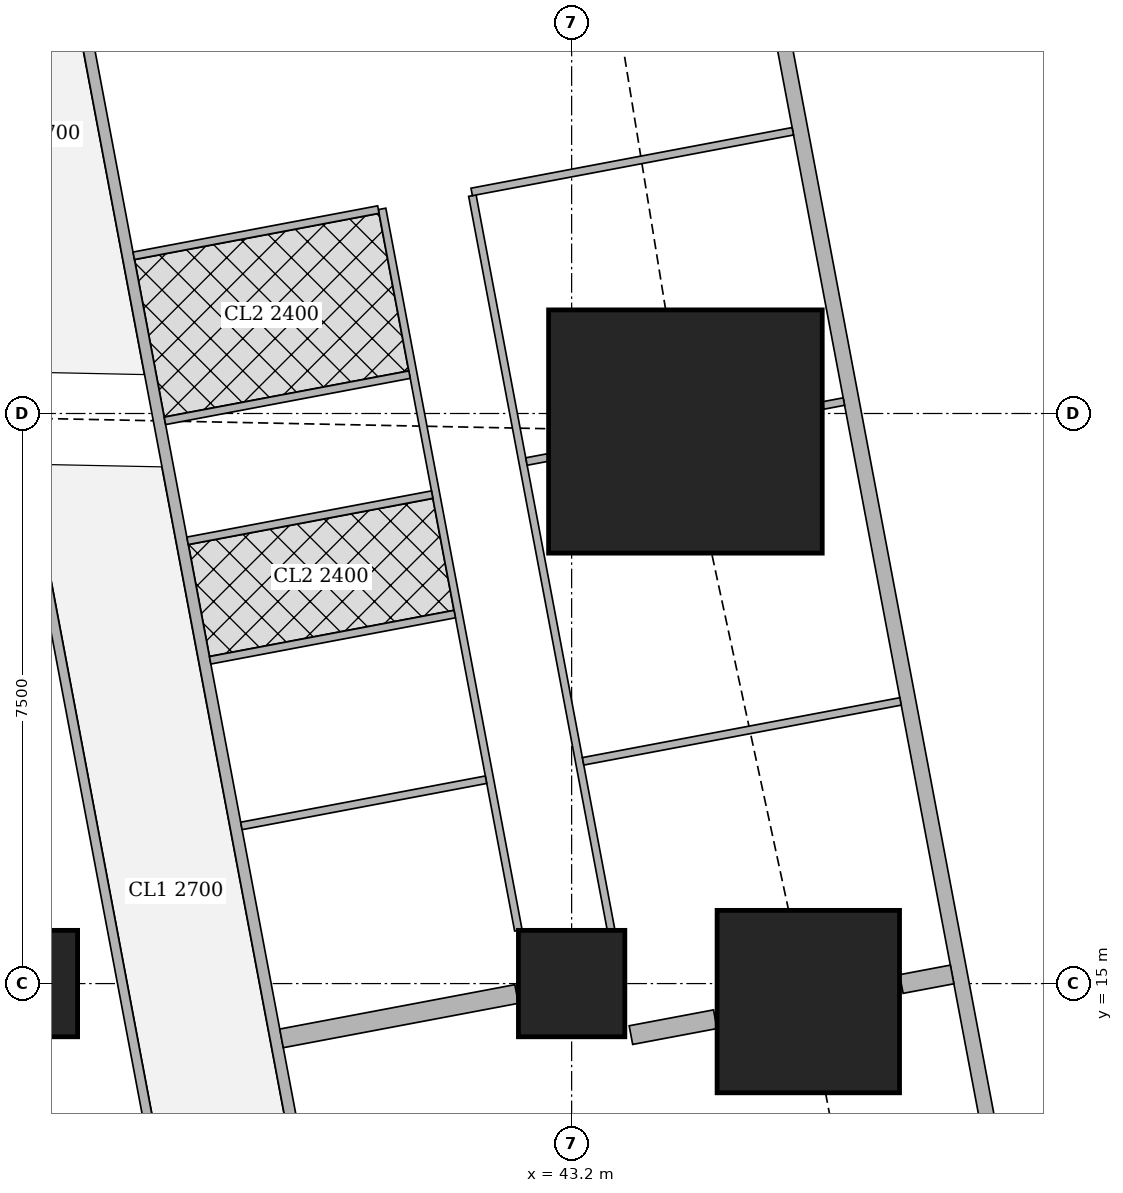
"""IFC4 building model, lengths in metres.
Left out: names, types, materials, properties, quantities, classifications, styles, units other than length and angle.
Written with IfcOpenShell. Run it as: python <this file> out.ifc"""

import sys

from ifc_helpers import new_model, si_unit, direction, frame, frame_2d, origin, origin_2d, place, context, subcontext, project, spatial, rectangle, extrude, element, fill, save


model = new_model("IFC4")
c1 = context("Model", 3, precision=1e-05, world=origin(), true_north=direction((0.0, 1.0)))
c2 = subcontext(c1, "Body", "Model", "MODEL_VIEW")
j1 = project(units=[si_unit("LENGTHUNIT", "METRE"), si_unit("PLANEANGLEUNIT", "RADIAN")], contexts=[c1])
p1 = place(None, origin())
s1 = spatial("IfcSite", under=j1, at=p1, CompositionType="ELEMENT")
p2 = place(p1, origin())
s2 = spatial("IfcBuilding", under=s1, at=p2, CompositionType="ELEMENT")
p3 = place(p2, frame((0.0, 0.0, 234.95)))
s3 = spatial("IfcBuildingStorey", under=s2, at=p3, CompositionType="ELEMENT", Elevation=234.95)
for number, where, z_axis, x_axis in (
    (1, (36.0, 15.0, 0.0), (0.0, 0.0, 1.0), (1.0, 0.0, 0.0)),
    (2, (43.2, 15.0, 0.0), (0.0, 0.0, 1.0), (1.0, 0.0, 0.0)),
):
    element("IfcColumn", number, at=place(p3, frame(where, z_axis=z_axis, x_axis=x_axis)), inside=s3, PredefinedType="COLUMN", context=c2, shape_type="SweptSolid", body=[
        extrude(rectangle(XDim=1.4, YDim=1.4, at=origin_2d()), origin(), (0.0, 0.0, 1.0), 3.75),
    ])
p4 = place(p3, frame((46.314, 14.763, 0.0), z_axis=(0.0, 0.0, 1.0), x_axis=(1.0, 0.0, 0.0)))
e3 = element("IfcColumn", 3, at=p4, inside=s3, PredefinedType="COLUMN", context=c2, shape_type="SweptSolid", body=[
    extrude(rectangle(XDim=2.4, YDim=2.4, at=origin_2d()), origin(), (0.0, 0.0, 1.0), 3.75),
])
p5 = place(p3, frame((44.697, 22.263, 0.0), z_axis=(0.0, 0.0, 1.0), x_axis=(1.0, 0.0, 0.0)))
e4 = element("IfcColumn", 4, at=p5, inside=s3, PredefinedType="COLUMN", context=c2, shape_type="SweptSolid", body=[
    extrude(rectangle(XDim=3.6, YDim=3.2, at=origin_2d()), origin(), (0.0, 0.0, 1.0), 3.75),
])
p6 = place(p3, frame((50.653, 2.703, 0.0), z_axis=(0.0, 0.0, 1.0), x_axis=(-0.185612026696, 0.982623109613, 0.0)))
e5 = element("IfcWall", 5, at=p6, inside=s3, PredefinedType="SOLIDWALL", context=c2, shape_type="SweptSolid", body=[
    extrude(rectangle(XDim=41.393, YDim=0.2, at=frame_2d((20.697, 0.0))), origin(), (0.0, 0.0, 1.0), 3.5),
])
p7 = place(p6, frame((1.633, 0.0, 0.9)))
e6 = element("IfcOpeningElement", 6, at=p7, cuts=e5, PredefinedType="OPENING", context=c2, shape_type="SweptSolid", body=[
    extrude(rectangle(XDim=1.8, YDim=1.5, at=frame_2d((0.9, 0.75))), frame((0.0, 0.11, 0.0), z_axis=(0.0, -1.0, 0.0), x_axis=(1.0, 0.0, 0.0)), (0.0, 0.0, 1.0), 0.22),
])
p8 = place(p6, frame((6.032, 0.0, 0.9)))
e7 = element("IfcOpeningElement", 7, at=p8, cuts=e5, PredefinedType="OPENING", context=c2, shape_type="SweptSolid", body=[
    extrude(rectangle(XDim=1.8, YDim=1.5, at=frame_2d((0.9, 0.75))), frame((0.0, 0.11, 0.0), z_axis=(0.0, -1.0, 0.0), x_axis=(1.0, 0.0, 0.0)), (0.0, 0.0, 1.0), 0.22),
])
p9 = place(p6, frame((9.848, 0.0, 0.9)))
e8 = element("IfcOpeningElement", 8, at=p9, cuts=e5, PredefinedType="OPENING", context=c2, shape_type="SweptSolid", body=[
    extrude(rectangle(XDim=1.8, YDim=1.5, at=frame_2d((0.9, 0.75))), frame((0.0, 0.11, 0.0), z_axis=(0.0, -1.0, 0.0), x_axis=(1.0, 0.0, 0.0)), (0.0, 0.0, 1.0), 0.22),
])
p10 = place(p6, frame((13.664, 0.0, 0.9)))
e9 = element("IfcOpeningElement", 9, at=p10, cuts=e5, PredefinedType="OPENING", context=c2, shape_type="SweptSolid", body=[
    extrude(rectangle(XDim=1.8, YDim=1.5, at=frame_2d((0.9, 0.75))), frame((0.0, 0.11, 0.0), z_axis=(0.0, -1.0, 0.0), x_axis=(1.0, 0.0, 0.0)), (0.0, 0.0, 1.0), 0.22),
])
p11 = place(p6, frame((17.481, 0.0, 0.9)))
e10 = element("IfcOpeningElement", 10, at=p11, cuts=e5, PredefinedType="OPENING", context=c2, shape_type="SweptSolid", body=[
    extrude(rectangle(XDim=1.8, YDim=1.5, at=frame_2d((0.9, 0.75))), frame((0.0, 0.11, 0.0), z_axis=(0.0, -1.0, 0.0), x_axis=(1.0, 0.0, 0.0)), (0.0, 0.0, 1.0), 0.22),
])
p12 = place(p6, frame((21.297, 0.0, 0.9)))
e11 = element("IfcOpeningElement", 11, at=p12, cuts=e5, PredefinedType="OPENING", context=c2, shape_type="SweptSolid", body=[
    extrude(rectangle(XDim=1.8, YDim=1.5, at=frame_2d((0.9, 0.75))), frame((0.0, 0.11, 0.0), z_axis=(0.0, -1.0, 0.0), x_axis=(1.0, 0.0, 0.0)), (0.0, 0.0, 1.0), 0.22),
])
p13 = place(p6, frame((25.113, 0.0, 0.9)))
e12 = element("IfcOpeningElement", 12, at=p13, cuts=e5, PredefinedType="OPENING", context=c2, shape_type="SweptSolid", body=[
    extrude(rectangle(XDim=1.8, YDim=1.5, at=frame_2d((0.9, 0.75))), frame((0.0, 0.11, 0.0), z_axis=(0.0, -1.0, 0.0), x_axis=(1.0, 0.0, 0.0)), (0.0, 0.0, 1.0), 0.22),
])
p14 = place(p6, frame((28.93, 0.0, 0.9)))
e13 = element("IfcOpeningElement", 13, at=p14, cuts=e5, PredefinedType="OPENING", context=c2, shape_type="SweptSolid", body=[
    extrude(rectangle(XDim=1.8, YDim=1.5, at=frame_2d((0.9, 0.75))), frame((0.0, 0.11, 0.0), z_axis=(0.0, -1.0, 0.0), x_axis=(1.0, 0.0, 0.0)), (0.0, 0.0, 1.0), 0.22),
])
p15 = place(p6, frame((32.746, 0.0, 0.9)))
e14 = element("IfcOpeningElement", 14, at=p15, cuts=e5, PredefinedType="OPENING", context=c2, shape_type="SweptSolid", body=[
    extrude(rectangle(XDim=1.8, YDim=1.5, at=frame_2d((0.9, 0.75))), frame((0.0, 0.11, 0.0), z_axis=(0.0, -1.0, 0.0), x_axis=(1.0, 0.0, 0.0)), (0.0, 0.0, 1.0), 0.22),
])
p16 = place(p6, frame((36.481, 0.0, 0.9)))
e15 = element("IfcOpeningElement", 15, at=p16, cuts=e5, PredefinedType="OPENING", context=c2, shape_type="SweptSolid", body=[
    extrude(rectangle(XDim=1.8, YDim=1.5, at=frame_2d((0.9, 0.75))), frame((0.0, 0.11, 0.0), z_axis=(0.0, -1.0, 0.0), x_axis=(1.0, 0.0, 0.0)), (0.0, 0.0, 1.0), 0.22),
])
p17 = place(p3, frame((33.933, 42.73, 0.0), z_axis=(0.0, 0.0, 1.0), x_axis=(0.185595417643, -0.982626246825, 0.0)))
e16 = element("IfcWall", 16, at=p17, inside=s3, PredefinedType="SOLIDWALL", context=c2, shape_type="SweptSolid", body=[
    extrude(rectangle(XDim=41.051, YDim=0.15, at=frame_2d((20.525, 0.0))), origin(), (0.0, 0.0, 1.0), 2.5),
])
p18 = place(p17, frame((12.266, 0.0, 0.0)))
e17 = element("IfcOpeningElement", 17, at=p18, cuts=e16, PredefinedType="OPENING", context=c2, shape_type="SweptSolid", body=[
    extrude(rectangle(XDim=1.0, YDim=2.1, at=frame_2d((0.5, 1.05))), frame((0.0, 0.085, 0.0), z_axis=(0.0, -1.0, 0.0), x_axis=(1.0, 0.0, 0.0)), (0.0, 0.0, 1.0), 0.17),
])
p19 = place(p17, frame((16.082, 0.0, 0.0)))
e18 = element("IfcOpeningElement", 18, at=p19, cuts=e16, PredefinedType="OPENING", context=c2, shape_type="SweptSolid", body=[
    extrude(rectangle(XDim=1.0, YDim=2.1, at=frame_2d((0.5, 1.05))), frame((0.0, 0.085, 0.0), z_axis=(0.0, -1.0, 0.0), x_axis=(1.0, 0.0, 0.0)), (0.0, 0.0, 1.0), 0.17),
])
p20 = place(p17, frame((30.862, 0.0, 0.0)))
e19 = element("IfcOpeningElement", 19, at=p20, cuts=e16, PredefinedType="OPENING", context=c2, shape_type="SweptSolid", body=[
    extrude(rectangle(XDim=1.0, YDim=2.1, at=frame_2d((0.5, 1.05))), frame((0.0, 0.085, 0.0), z_axis=(0.0, -1.0, 0.0), x_axis=(1.0, 0.0, 0.0)), (0.0, 0.0, 1.0), 0.17),
])
p21 = place(p3, frame((41.894, 25.366, 0.0), z_axis=(0.0, 0.0, 1.0), x_axis=(0.185612905165, -0.982622943675, 0.0)))
e20 = element("IfcWall", 20, at=p21, inside=s3, PredefinedType="PARTITIONING", context=c2, shape_type="SweptSolid", body=[
    extrude(rectangle(XDim=9.827, YDim=0.1, at=frame_2d((4.913, 0.0))), origin(), (0.0, 0.0, 1.0), 2.5),
])
p22 = place(p21, frame((0.151, 0.0, 0.0)))
e21 = element("IfcOpeningElement", 21, at=p22, cuts=e20, PredefinedType="OPENING", context=c2, shape_type="SweptSolid", body=[
    extrude(rectangle(XDim=0.9, YDim=2.1, at=frame_2d((0.45, 1.05))), frame((0.0, 0.06, 0.0), z_axis=(0.0, -1.0, 0.0), x_axis=(1.0, 0.0, 0.0)), (0.0, 0.0, 1.0), 0.12),
])
p23 = place(p21, frame((5.05, 0.0, 0.0)))
e22 = element("IfcOpeningElement", 22, at=p23, cuts=e20, PredefinedType="OPENING", context=c2, shape_type="SweptSolid", body=[
    extrude(rectangle(XDim=0.9, YDim=2.1, at=frame_2d((0.45, 1.05))), frame((0.0, 0.06, 0.0), z_axis=(0.0, -1.0, 0.0), x_axis=(1.0, 0.0, 0.0)), (0.0, 0.0, 1.0), 0.12),
])
p24 = place(p21, frame((7.783, 0.0, 0.0)))
e23 = element("IfcOpeningElement", 23, at=p24, cuts=e20, PredefinedType="OPENING", context=c2, shape_type="SweptSolid", body=[
    extrude(rectangle(XDim=0.9, YDim=2.1, at=frame_2d((0.45, 1.05))), frame((0.0, 0.06, 0.0), z_axis=(0.0, -1.0, 0.0), x_axis=(1.0, 0.0, 0.0)), (0.0, 0.0, 1.0), 0.12),
])
p25 = place(p3, frame((40.706, 25.192, 0.0), z_axis=(0.0, 0.0, 1.0), x_axis=(0.185629824463, -0.982619747547, 0.0)))
e24 = element("IfcWall", 24, at=p25, inside=s3, PredefinedType="PARTITIONING", context=c2, shape_type="SweptSolid", body=[
    extrude(rectangle(XDim=9.659, YDim=0.1, at=frame_2d((4.83, 0.0))), origin(), (0.0, 0.0, 1.0), 2.5),
])
p26 = place(p25, frame((0.655, 0.0, 0.0)))
e25 = element("IfcOpeningElement", 25, at=p26, cuts=e24, PredefinedType="OPENING", context=c2, shape_type="SweptSolid", body=[
    extrude(rectangle(XDim=0.9, YDim=2.1, at=frame_2d((0.45, 1.05))), frame((0.0, 0.06, 0.0), z_axis=(0.0, -1.0, 0.0), x_axis=(1.0, 0.0, 0.0)), (0.0, 0.0, 1.0), 0.12),
])
p27 = place(p25, frame((4.166, 0.0, 0.0)))
e26 = element("IfcOpeningElement", 26, at=p27, cuts=e24, PredefinedType="OPENING", context=c2, shape_type="SweptSolid", body=[
    extrude(rectangle(XDim=0.9, YDim=2.1, at=frame_2d((0.45, 1.05))), frame((0.0, 0.06, 0.0), z_axis=(0.0, -1.0, 0.0), x_axis=(1.0, 0.0, 0.0)), (0.0, 0.0, 1.0), 0.12),
])
p28 = place(p25, frame((2.563, 0.0, 0.0)))
e27 = element("IfcOpeningElement", 27, at=p28, cuts=e24, PredefinedType="OPENING", context=c2, shape_type="SweptSolid", body=[
    extrude(rectangle(XDim=0.9, YDim=2.1, at=frame_2d((0.45, 1.05))), frame((0.0, 0.06, 0.0), z_axis=(0.0, -1.0, 0.0), x_axis=(1.0, 0.0, 0.0)), (0.0, 0.0, 1.0), 0.12),
])
p29 = place(p25, frame((6.074, 0.0, 0.0)))
e28 = element("IfcOpeningElement", 28, at=p29, cuts=e24, PredefinedType="OPENING", context=c2, shape_type="SweptSolid", body=[
    extrude(rectangle(XDim=0.9, YDim=2.1, at=frame_2d((0.45, 1.05))), frame((0.0, 0.06, 0.0), z_axis=(0.0, -1.0, 0.0), x_axis=(1.0, 0.0, 0.0)), (0.0, 0.0, 1.0), 0.12),
])
p30 = place(p3, frame((46.11, 26.213, 0.0), z_axis=(0.0, 0.0, 1.0), x_axis=(-0.982633535512, -0.185556823879, 0.0)))
e29 = element("IfcWall", 29, at=p30, inside=s3, PredefinedType="PARTITIONING", context=c2, shape_type="SweptSolid", body=[
    extrude(rectangle(XDim=4.3, YDim=0.1, at=frame_2d((2.15, 0.0))), origin(), (0.0, 0.0, 1.0), 2.05),
])
p31 = place(p3, frame((46.782, 22.657, 0.0), z_axis=(0.0, 0.0, 1.0), x_axis=(-0.982574553168, -0.185868898601, 0.0)))
e30 = element("IfcWall", 30, at=p31, inside=s3, PredefinedType="PARTITIONING", context=c2, shape_type="SweptSolid", body=[
    extrude(rectangle(XDim=0.28, YDim=0.1, at=frame_2d((0.14, 0.0))), origin(), (0.0, 0.0, 1.0), 3.5),
])
p32 = place(p3, frame((42.887, 21.921, 0.0), z_axis=(0.0, 0.0, 1.0), x_axis=(-0.982688058078, -0.185267861514, 0.0)))
e31 = element("IfcWall", 31, at=p32, inside=s3, PredefinedType="PARTITIONING", context=c2, shape_type="SweptSolid", body=[
    extrude(rectangle(XDim=0.286, YDim=0.1, at=frame_2d((0.143, 0.0))), origin(), (0.0, 0.0, 1.0), 2.5),
])
p33 = place(p3, frame((47.527, 18.712, 0.0), z_axis=(0.0, 0.0, 1.0), x_axis=(-0.982665405803, -0.185387972203, 0.0)))
e32 = element("IfcWall", 32, at=p33, inside=s3, PredefinedType="PARTITIONING", context=c2, shape_type="SweptSolid", body=[
    extrude(rectangle(XDim=4.25, YDim=0.1, at=frame_2d((2.125, 0.0))), origin(), (0.0, 0.0, 1.0), 2.05),
])
for number, where, z_axis, x_axis in (
    (33, (40.657, 25.183, 0.0), (0.0, 0.0, 1.0), (-0.983, -0.186, 0.0)),
    (34, (41.365, 21.433, 0.0), (0.0, 0.0, 1.0), (-0.983, -0.186, 0.0)),
):
    element("IfcWall", number, at=place(p3, frame(where, z_axis=z_axis, x_axis=x_axis)), inside=s3, PredefinedType="PARTITIONING", context=c2, shape_type="SweptSolid", body=[
        extrude(rectangle(XDim=3.275, YDim=0.1, at=frame_2d((1.637, 0.0))), origin(), (0.0, 0.0, 1.0), 3.5),
    ])
p34 = place(p3, frame((42.073, 17.682, 0.0), z_axis=(0.0, 0.0, 1.0), x_axis=(-0.982620626894, -0.185625169636, 0.0)))
e35 = element("IfcWall", 35, at=p34, inside=s3, PredefinedType="PARTITIONING", context=c2, shape_type="SweptSolid", body=[
    extrude(rectangle(XDim=3.275, YDim=0.1, at=frame_2d((1.637, 0.0))), origin(), (0.0, 0.0, 1.0), 3.5),
])
p35 = place(p34, frame((1.2, 0.0, 0.0)))
e36 = element("IfcOpeningElement", 36, at=p35, cuts=e35, PredefinedType="OPENING", context=c2, shape_type="SweptSolid", body=[
    extrude(rectangle(XDim=0.9, YDim=2.1, at=frame_2d((0.45, 1.05))), frame((0.0, 0.06, 0.0), z_axis=(0.0, -1.0, 0.0), x_axis=(1.0, 0.0, 0.0)), (0.0, 0.0, 1.0), 0.12),
])
p36 = place(p3, frame((41.067, 23.011, 0.0), z_axis=(0.0, 0.0, 1.0), x_axis=(-0.982618057925, -0.185638768151, 0.0)))
e37 = element("IfcWall", 37, at=p36, inside=s3, PredefinedType="PARTITIONING", context=c2, shape_type="SweptSolid", body=[
    extrude(rectangle(XDim=3.275, YDim=0.1, at=frame_2d((1.637, 0.0))), origin(), (0.0, 0.0, 1.0), 2.5),
])
p37 = place(p3, frame((41.662, 19.861, 0.0), z_axis=(0.0, 0.0, 1.0), x_axis=(-0.982607026909, -0.185697147715, 0.0)))
e38 = element("IfcWall", 38, at=p37, inside=s3, PredefinedType="PARTITIONING", context=c2, shape_type="SweptSolid", body=[
    extrude(rectangle(XDim=3.275, YDim=0.1, at=frame_2d((1.637, 0.0))), origin(), (0.0, 0.0, 1.0), 3.5),
])
p38 = place(p3, frame((48.206, 15.12, 0.0), z_axis=(0.0, 0.0, 1.0), x_axis=(-0.982610999048, -0.18567612811, 0.0)))
e39 = element("IfcWall", 39, at=p38, inside=s3, PredefinedType="SOLIDWALL", context=c2, shape_type="SweptSolid", body=[
    extrude(rectangle(XDim=0.68, YDim=0.25, at=frame_2d((0.34, 0.0))), origin(), (0.0, 0.0, 1.0), 2.05),
])
p39 = place(p3, frame((45.09, 14.531, 0.0), z_axis=(0.0, 0.0, 1.0), x_axis=(-0.982737354171, -0.185006196431, 0.0)))
e40 = element("IfcWall", 40, at=p39, inside=s3, PredefinedType="SOLIDWALL", context=c2, shape_type="SweptSolid", body=[
    extrude(rectangle(XDim=1.13, YDim=0.25, at=frame_2d((0.565, 0.0))), origin(), (0.0, 0.0, 1.0), 2.05),
])
p40 = place(p3, frame((42.476, 14.863, 0.0), z_axis=(0.0, 0.0, 1.0), x_axis=(-0.982638716117, -0.185529387398, 0.0)))
e41 = element("IfcWall", 41, at=p40, inside=s3, PredefinedType="SOLIDWALL", context=c2, shape_type="SweptSolid", body=[
    extrude(rectangle(XDim=3.148, YDim=0.25, at=frame_2d((1.574, 0.0))), origin(), (0.0, 0.0, 1.0), 3.5),
])
p41 = place(p3, frame((38.202, 10.163, 0.0), z_axis=(0.0, 0.0, 1.0), x_axis=(-0.185610321132, 0.982623431783, 0.0)))
e42 = element("IfcWall", 42, at=p41, inside=s3, PredefinedType="PARTITIONING", context=c2, shape_type="SweptSolid", body=[
    extrude(rectangle(XDim=25.111, YDim=0.125, at=frame_2d((12.556, 0.0))), origin(), (0.0, 0.0, 1.0), 2.5),
])
p42 = place(p41, frame((0.708, 0.0, 0.0)))
e43 = element("IfcOpeningElement", 43, at=p42, cuts=e42, PredefinedType="OPENING", context=c2, shape_type="SweptSolid", body=[
    extrude(rectangle(XDim=1.0, YDim=2.1, at=frame_2d((0.5, 1.05))), frame((0.0, 0.073, 0.0), z_axis=(0.0, -1.0, 0.0), x_axis=(1.0, 0.0, 0.0)), (0.0, 0.0, 1.0), 0.145),
])
p43 = place(p41, frame((13.378, 0.0, 0.0)))
e44 = element("IfcOpeningElement", 44, at=p43, cuts=e42, PredefinedType="OPENING", context=c2, shape_type="SweptSolid", body=[
    extrude(rectangle(XDim=1.0, YDim=2.1, at=frame_2d((0.5, 1.05))), frame((0.0, 0.073, 0.0), z_axis=(0.0, -1.0, 0.0), x_axis=(1.0, 0.0, 0.0)), (0.0, 0.0, 1.0), 0.145),
])
p44 = place(p41, frame((21.15, 0.0, 0.0)))
e45 = element("IfcOpeningElement", 45, at=p44, cuts=e42, PredefinedType="OPENING", context=c2, shape_type="SweptSolid", body=[
    extrude(rectangle(XDim=1.0, YDim=2.1, at=frame_2d((0.5, 1.05))), frame((0.0, 0.073, 0.0), z_axis=(0.0, -1.0, 0.0), x_axis=(1.0, 0.0, 0.0)), (0.0, 0.0, 1.0), 0.145),
])
p45 = place(p41, frame((23.453, 0.0, 0.0)))
e46 = element("IfcOpeningElement", 46, at=p45, cuts=e42, PredefinedType="OPENING", context=c2, shape_type="SweptSolid", body=[
    extrude(rectangle(XDim=1.0, YDim=2.1, at=frame_2d((0.5, 1.05))), frame((0.0, 0.073, 0.0), z_axis=(0.0, -1.0, 0.0), x_axis=(1.0, 0.0, 0.0)), (0.0, 0.0, 1.0), 0.145),
])
p46 = place(p9, origin())
e47 = element("IfcWindow", 47, at=p46, inside=s3, PartitioningType="SINGLE_PANEL", PredefinedType="WINDOW", context=c2, shape_type="SweptSolid", body=[
    extrude(rectangle(XDim=1.8, YDim=1.5, at=frame_2d((0.9, 0.75))), frame((0.0, 0.03, 0.0), z_axis=(0.0, -1.0, 0.0), x_axis=(1.0, 0.0, 0.0)), (0.0, 0.0, 1.0), 0.06),
])
fill(e8, e47)
p47 = place(p10, origin())
e48 = element("IfcWindow", 48, at=p47, inside=s3, PartitioningType="SINGLE_PANEL", PredefinedType="WINDOW", context=c2, shape_type="SweptSolid", body=[
    extrude(rectangle(XDim=1.8, YDim=1.5, at=frame_2d((0.9, 0.75))), frame((0.0, 0.03, 0.0), z_axis=(0.0, -1.0, 0.0), x_axis=(1.0, 0.0, 0.0)), (0.0, 0.0, 1.0), 0.06),
])
fill(e9, e48)
p48 = place(p11, origin())
e49 = element("IfcWindow", 49, at=p48, inside=s3, PartitioningType="SINGLE_PANEL", PredefinedType="WINDOW", context=c2, shape_type="SweptSolid", body=[
    extrude(rectangle(XDim=1.8, YDim=1.5, at=frame_2d((0.9, 0.75))), frame((0.0, 0.03, 0.0), z_axis=(0.0, -1.0, 0.0), x_axis=(1.0, 0.0, 0.0)), (0.0, 0.0, 1.0), 0.06),
])
fill(e10, e49)
p49 = place(p12, origin())
e50 = element("IfcWindow", 50, at=p49, inside=s3, PartitioningType="SINGLE_PANEL", PredefinedType="WINDOW", context=c2, shape_type="SweptSolid", body=[
    extrude(rectangle(XDim=1.8, YDim=1.5, at=frame_2d((0.9, 0.75))), frame((0.0, 0.03, 0.0), z_axis=(0.0, -1.0, 0.0), x_axis=(1.0, 0.0, 0.0)), (0.0, 0.0, 1.0), 0.06),
])
fill(e11, e50)
p50 = place(p22, origin())
e51 = element("IfcDoor", 51, at=p50, inside=s3, OperationType="SINGLE_SWING_LEFT", PredefinedType="DOOR", context=c2, shape_type="SweptSolid", body=[
    extrude(rectangle(XDim=0.9, YDim=2.1, at=frame_2d((0.45, 1.05))), frame((0.0, 0.025, 0.0), z_axis=(0.0, -1.0, 0.0), x_axis=(1.0, 0.0, 0.0)), (0.0, 0.0, 1.0), 0.05),
])
fill(e21, e51)
p51 = place(p23, origin())
e52 = element("IfcDoor", 52, at=p51, inside=s3, OperationType="SINGLE_SWING_LEFT", PredefinedType="DOOR", context=c2, shape_type="SweptSolid", body=[
    extrude(rectangle(XDim=0.9, YDim=2.1, at=frame_2d((0.45, 1.05))), frame((0.0, 0.025, 0.0), z_axis=(0.0, -1.0, 0.0), x_axis=(1.0, 0.0, 0.0)), (0.0, 0.0, 1.0), 0.05),
])
fill(e22, e52)
p52 = place(p24, origin())
e53 = element("IfcDoor", 53, at=p52, inside=s3, OperationType="SINGLE_SWING_LEFT", PredefinedType="DOOR", context=c2, shape_type="SweptSolid", body=[
    extrude(rectangle(XDim=0.9, YDim=2.1, at=frame_2d((0.45, 1.05))), frame((0.0, 0.025, 0.0), z_axis=(0.0, -1.0, 0.0), x_axis=(1.0, 0.0, 0.0)), (0.0, 0.0, 1.0), 0.05),
])
fill(e23, e53)
p53 = place(p26, origin())
e54 = element("IfcDoor", 54, at=p53, inside=s3, OperationType="SINGLE_SWING_RIGHT", PredefinedType="DOOR", context=c2, shape_type="SweptSolid", body=[
    extrude(rectangle(XDim=0.9, YDim=2.1, at=frame_2d((0.45, 1.05))), frame((0.0, 0.025, 0.0), z_axis=(0.0, -1.0, 0.0), x_axis=(1.0, 0.0, 0.0)), (0.0, 0.0, 1.0), 0.05),
])
fill(e25, e54)
p54 = place(p27, origin())
e55 = element("IfcDoor", 55, at=p54, inside=s3, OperationType="SINGLE_SWING_LEFT", PredefinedType="DOOR", context=c2, shape_type="SweptSolid", body=[
    extrude(rectangle(XDim=0.9, YDim=2.1, at=frame_2d((0.45, 1.05))), frame((0.0, 0.025, 0.0), z_axis=(0.0, -1.0, 0.0), x_axis=(1.0, 0.0, 0.0)), (0.0, 0.0, 1.0), 0.05),
])
fill(e26, e55)
p55 = place(p28, origin())
e56 = element("IfcDoor", 56, at=p55, inside=s3, OperationType="SINGLE_SWING_LEFT", PredefinedType="DOOR", context=c2, shape_type="SweptSolid", body=[
    extrude(rectangle(XDim=0.9, YDim=2.1, at=frame_2d((0.45, 1.05))), frame((0.0, 0.025, 0.0), z_axis=(0.0, -1.0, 0.0), x_axis=(1.0, 0.0, 0.0)), (0.0, 0.0, 1.0), 0.05),
])
fill(e27, e56)
p56 = place(p29, origin())
e57 = element("IfcDoor", 57, at=p56, inside=s3, OperationType="SINGLE_SWING_RIGHT", PredefinedType="DOOR", context=c2, shape_type="SweptSolid", body=[
    extrude(rectangle(XDim=0.9, YDim=2.1, at=frame_2d((0.45, 1.05))), frame((0.0, 0.025, 0.0), z_axis=(0.0, -1.0, 0.0), x_axis=(1.0, 0.0, 0.0)), (0.0, 0.0, 1.0), 0.05),
])
fill(e28, e57)
p57 = place(p19, origin())
e58 = element("IfcDoor", 58, at=p57, inside=s3, OperationType="SINGLE_SWING_LEFT", PredefinedType="DOOR", context=c2, shape_type="SweptSolid", body=[
    extrude(rectangle(XDim=1.0, YDim=2.1, at=frame_2d((0.5, 1.05))), frame((0.0, 0.025, 0.0), z_axis=(0.0, -1.0, 0.0), x_axis=(1.0, 0.0, 0.0)), (0.0, 0.0, 1.0), 0.05),
])
fill(e18, e58)
p58 = place(p35, origin())
e59 = element("IfcDoor", 59, at=p58, inside=s3, OperationType="SINGLE_SWING_LEFT", PredefinedType="DOOR", context=c2, shape_type="SweptSolid", body=[
    extrude(rectangle(XDim=0.9, YDim=2.1, at=frame_2d((0.45, 1.05))), frame((0.0, 0.025, 0.0), z_axis=(0.0, -1.0, 0.0), x_axis=(1.0, 0.0, 0.0)), (0.0, 0.0, 1.0), 0.05),
])
fill(e36, e59)
save(model, sys.argv[1])
